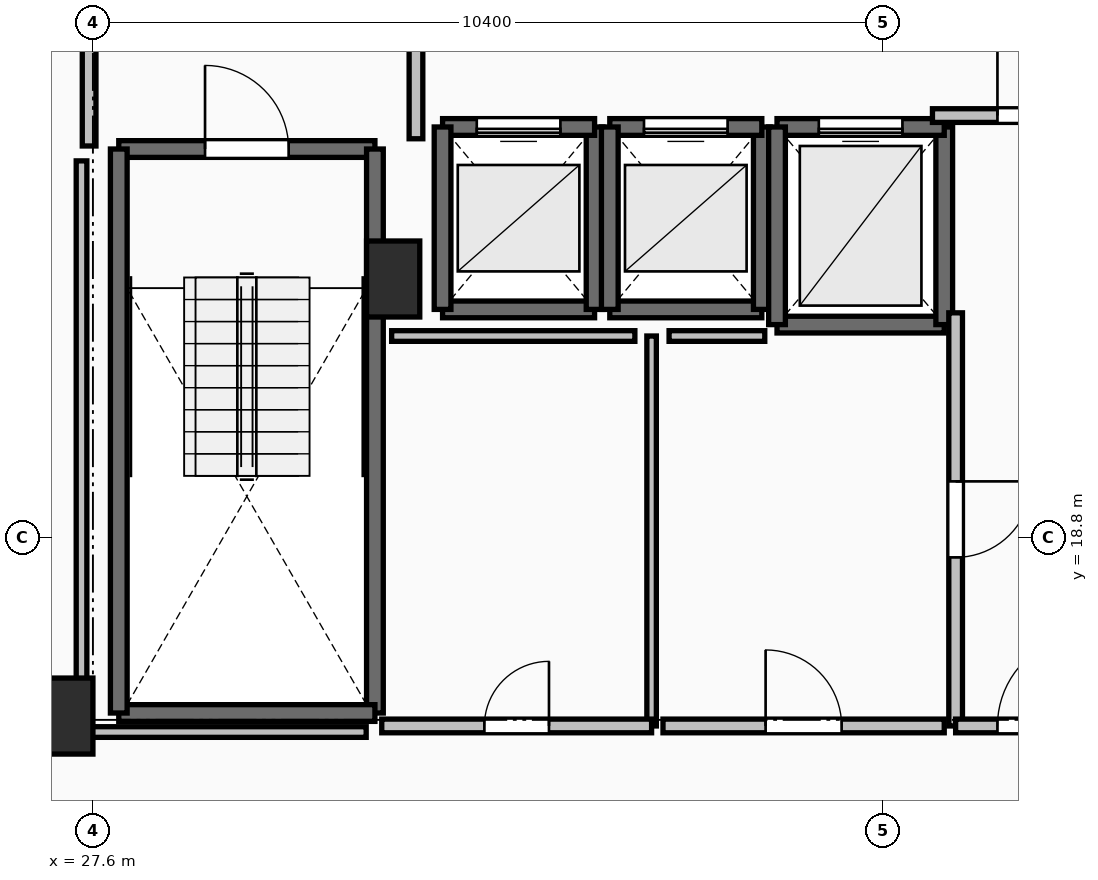
"""IFC4 building model, lengths in metres.
Left out: names, types, materials, properties, quantities, classifications, styles, units other than length and angle.
Written with IfcOpenShell. Run it as: python <this file> out.ifc"""

import sys

from ifc_helpers import new_model, si_unit, direction, frame, frame_2d, origin, origin_2d, place, context, subcontext, project, spatial, rectangle, extrude, element, fill, save


model = new_model("IFC4")
c1 = context("Model", 3, precision=1e-05, world=origin(), true_north=direction((0.0, 1.0)))
c2 = subcontext(c1, "Body", "Model", "MODEL_VIEW")
j1 = project(units=[si_unit("LENGTHUNIT", "METRE"), si_unit("PLANEANGLEUNIT", "RADIAN")], contexts=[c1])
p1 = place(None, origin())
s1 = spatial("IfcSite", under=j1, at=p1, CompositionType="ELEMENT")
p2 = place(p1, origin())
s2 = spatial("IfcBuilding", under=s1, at=p2, CompositionType="ELEMENT")
p3 = place(p2, frame((0.0, 0.0, 189.6)))
s3 = spatial("IfcBuildingStorey", under=s2, at=p3, CompositionType="ELEMENT", Elevation=189.6)
for number, where, z_axis, x_axis in (
    (1, (27.25, 16.45, 0.0), (0.0, 0.0, 1.0), (1.0, 0.0, 0.0)),
    (2, (31.55, 22.2, 0.0), (0.0, 0.0, 1.0), (1.0, 0.0, 0.0)),
):
    element("IfcColumn", number, at=place(p3, frame(where, z_axis=z_axis, x_axis=x_axis)), inside=s3, PredefinedType="PILASTER", context=c2, shape_type="SweptSolid", body=[
        extrude(rectangle(XDim=0.7, YDim=1.0, at=origin_2d()), origin(), (0.0, 0.0, 1.0), 3.5),
    ])
p4 = place(p3, frame((27.94, 23.91, 0.0), z_axis=(0.0, 0.0, 1.0), x_axis=(1.0, 0.0, 0.0)))
e3 = element("IfcWall", 3, at=p4, inside=s3, PredefinedType="SOLIDWALL", context=c2, shape_type="SweptSolid", body=[
    extrude(rectangle(XDim=3.37, YDim=0.22, at=frame_2d((1.685, 0.0))), origin(), (0.0, 0.0, 1.0), 3.24),
])
p5 = place(p4, frame((1.135, 0.0, 0.0)))
e4 = element("IfcOpeningElement", 4, at=p5, cuts=e3, PredefinedType="OPENING", context=c2, shape_type="SweptSolid", body=[
    extrude(rectangle(XDim=1.1, YDim=2.15, at=frame_2d((0.55, 1.075))), frame((0.0, 0.125, 0.0), z_axis=(0.0, -1.0, 0.0), x_axis=(1.0, 0.0, 0.0)), (0.0, 0.0, 1.0), 0.25),
])
p6 = place(p3, frame((31.31, 23.91, 0.0), z_axis=(0.0, 0.0, 1.0), x_axis=(0.0, -1.0, 0.0)))
e5 = element("IfcWall", 5, at=p6, inside=s3, PredefinedType="SOLIDWALL", context=c2, shape_type="SweptSolid", body=[
    extrude(rectangle(XDim=7.42, YDim=0.22, at=frame_2d((3.71, 0.0))), origin(), (0.0, 0.0, 1.0), 3.24),
])
p7 = place(p3, frame((31.31, 16.49, 0.0), z_axis=(0.0, 0.0, 1.0), x_axis=(-1.0, 0.0, 0.0)))
e6 = element("IfcWall", 6, at=p7, inside=s3, PredefinedType="SOLIDWALL", context=c2, shape_type="SweptSolid", body=[
    extrude(rectangle(XDim=3.37, YDim=0.22, at=frame_2d((1.685, 0.0))), origin(), (0.0, 0.0, 1.0), 3.24),
])
p8 = place(p3, frame((27.94, 16.49, 0.0), z_axis=(0.0, 0.0, 1.0), x_axis=(0.0, 1.0, 0.0)))
e7 = element("IfcWall", 7, at=p8, inside=s3, PredefinedType="SOLIDWALL", context=c2, shape_type="SweptSolid", body=[
    extrude(rectangle(XDim=7.42, YDim=0.22, at=frame_2d((3.71, 0.0))), origin(), (0.0, 0.0, 1.0), 3.24),
])
p9 = place(p3, frame((32.2, 21.8, 0.0), z_axis=(0.0, 0.0, 1.0), x_axis=(1.0, 0.0, 0.0)))
e8 = element("IfcWall", 8, at=p9, inside=s3, PredefinedType="SOLIDWALL", context=c2, shape_type="SweptSolid", body=[
    extrude(rectangle(XDim=2.0, YDim=0.22, at=frame_2d((1.0, 0.0))), origin(), (0.0, 0.0, 1.0), 3.24),
])
p10 = place(p3, frame((34.2, 21.8, 0.0), z_axis=(0.0, 0.0, 1.0), x_axis=(0.0, 1.0, 0.0)))
e9 = element("IfcWall", 9, at=p10, inside=s3, PredefinedType="SOLIDWALL", context=c2, shape_type="SweptSolid", body=[
    extrude(rectangle(XDim=2.4, YDim=0.22, at=frame_2d((1.2, 0.0))), origin(), (0.0, 0.0, 1.0), 3.24),
])
p11 = place(p3, frame((34.2, 24.2, 0.0), z_axis=(0.0, 0.0, 1.0), x_axis=(-1.0, 0.0, 0.0)))
e10 = element("IfcWall", 10, at=p11, inside=s3, PredefinedType="SOLIDWALL", context=c2, shape_type="SweptSolid", body=[
    extrude(rectangle(XDim=2.0, YDim=0.22, at=frame_2d((1.0, 0.0))), origin(), (0.0, 0.0, 1.0), 3.24),
])
p12 = place(p11, frame((0.45, 0.0, 0.0)))
e11 = element("IfcOpeningElement", 11, at=p12, cuts=e10, PredefinedType="OPENING", context=c2, shape_type="SweptSolid", body=[
    extrude(rectangle(XDim=1.1, YDim=2.2, at=frame_2d((0.55, 1.1))), frame((0.0, 0.125, 0.0), z_axis=(0.0, -1.0, 0.0), x_axis=(1.0, 0.0, 0.0)), (0.0, 0.0, 1.0), 0.25),
])
p13 = place(p3, frame((32.2, 24.2, 0.0), z_axis=(0.0, 0.0, 1.0), x_axis=(0.0, -1.0, 0.0)))
e12 = element("IfcWall", 12, at=p13, inside=s3, PredefinedType="SOLIDWALL", context=c2, shape_type="SweptSolid", body=[
    extrude(rectangle(XDim=2.4, YDim=0.22, at=frame_2d((1.2, 0.0))), origin(), (0.0, 0.0, 1.0), 3.24),
])
p14 = place(p3, frame((34.4, 21.8, 0.0), z_axis=(0.0, 0.0, 1.0), x_axis=(1.0, 0.0, 0.0)))
e13 = element("IfcWall", 13, at=p14, inside=s3, PredefinedType="SOLIDWALL", context=c2, shape_type="SweptSolid", body=[
    extrude(rectangle(XDim=2.0, YDim=0.22, at=frame_2d((1.0, 0.0))), origin(), (0.0, 0.0, 1.0), 3.24),
])
p15 = place(p3, frame((36.4, 21.8, 0.0), z_axis=(0.0, 0.0, 1.0), x_axis=(0.0, 1.0, 0.0)))
e14 = element("IfcWall", 14, at=p15, inside=s3, PredefinedType="SOLIDWALL", context=c2, shape_type="SweptSolid", body=[
    extrude(rectangle(XDim=2.4, YDim=0.22, at=frame_2d((1.2, 0.0))), origin(), (0.0, 0.0, 1.0), 3.24),
])
p16 = place(p3, frame((36.4, 24.2, 0.0), z_axis=(0.0, 0.0, 1.0), x_axis=(-1.0, 0.0, 0.0)))
e15 = element("IfcWall", 15, at=p16, inside=s3, PredefinedType="SOLIDWALL", context=c2, shape_type="SweptSolid", body=[
    extrude(rectangle(XDim=2.0, YDim=0.22, at=frame_2d((1.0, 0.0))), origin(), (0.0, 0.0, 1.0), 3.24),
])
p17 = place(p16, frame((0.45, 0.0, 0.0)))
e16 = element("IfcOpeningElement", 16, at=p17, cuts=e15, PredefinedType="OPENING", context=c2, shape_type="SweptSolid", body=[
    extrude(rectangle(XDim=1.1, YDim=2.2, at=frame_2d((0.55, 1.1))), frame((0.0, 0.125, 0.0), z_axis=(0.0, -1.0, 0.0), x_axis=(1.0, 0.0, 0.0)), (0.0, 0.0, 1.0), 0.25),
])
p18 = place(p3, frame((34.4, 24.2, 0.0), z_axis=(0.0, 0.0, 1.0), x_axis=(0.0, -1.0, 0.0)))
e17 = element("IfcWall", 17, at=p18, inside=s3, PredefinedType="SOLIDWALL", context=c2, shape_type="SweptSolid", body=[
    extrude(rectangle(XDim=2.4, YDim=0.22, at=frame_2d((1.2, 0.0))), origin(), (0.0, 0.0, 1.0), 3.24),
])
p19 = place(p3, frame((36.6, 21.6, 0.0), z_axis=(0.0, 0.0, 1.0), x_axis=(1.0, 0.0, 0.0)))
e18 = element("IfcWall", 18, at=p19, inside=s3, PredefinedType="SOLIDWALL", context=c2, shape_type="SweptSolid", body=[
    extrude(rectangle(XDim=2.2, YDim=0.22, at=frame_2d((1.1, 0.0))), origin(), (0.0, 0.0, 1.0), 3.24),
])
p20 = place(p3, frame((38.8, 21.6, 0.0), z_axis=(0.0, 0.0, 1.0), x_axis=(0.0, 1.0, 0.0)))
e19 = element("IfcWall", 19, at=p20, inside=s3, PredefinedType="SOLIDWALL", context=c2, shape_type="SweptSolid", body=[
    extrude(rectangle(XDim=2.6, YDim=0.22, at=frame_2d((1.3, 0.0))), origin(), (0.0, 0.0, 1.0), 3.24),
])
p21 = place(p3, frame((38.8, 24.2, 0.0), z_axis=(0.0, 0.0, 1.0), x_axis=(-1.0, 0.0, 0.0)))
e20 = element("IfcWall", 20, at=p21, inside=s3, PredefinedType="SOLIDWALL", context=c2, shape_type="SweptSolid", body=[
    extrude(rectangle(XDim=2.2, YDim=0.22, at=frame_2d((1.1, 0.0))), origin(), (0.0, 0.0, 1.0), 3.24),
])
p22 = place(p21, frame((0.55, 0.0, 0.0)))
e21 = element("IfcOpeningElement", 21, at=p22, cuts=e20, PredefinedType="OPENING", context=c2, shape_type="SweptSolid", body=[
    extrude(rectangle(XDim=1.1, YDim=2.2, at=frame_2d((0.55, 1.1))), frame((0.0, 0.125, 0.0), z_axis=(0.0, -1.0, 0.0), x_axis=(1.0, 0.0, 0.0)), (0.0, 0.0, 1.0), 0.25),
])
p23 = place(p3, frame((36.6, 24.2, 0.0), z_axis=(0.0, 0.0, 1.0), x_axis=(0.0, -1.0, 0.0)))
e22 = element("IfcWall", 22, at=p23, inside=s3, PredefinedType="SOLIDWALL", context=c2, shape_type="SweptSolid", body=[
    extrude(rectangle(XDim=2.6, YDim=0.22, at=frame_2d((1.3, 0.0))), origin(), (0.0, 0.0, 1.0), 3.24),
])
p24 = place(p3, frame((31.85, 24.045, 0.0), z_axis=(0.0, 0.0, 1.0), x_axis=(0.0, 1.0, 0.0)))
e23 = element("IfcWall", 23, at=p24, inside=s3, PredefinedType="PARTITIONING", context=c2, shape_type="SweptSolid", body=[
    extrude(rectangle(XDim=3.91, YDim=0.18, at=frame_2d((1.955, 0.0))), origin(), (0.0, 0.0, 1.0), 3.24),
])
p25 = place(p24, frame((1.355, 0.0, 0.0)))
e24 = element("IfcOpeningElement", 24, at=p25, cuts=e23, PredefinedType="OPENING", context=c2, shape_type="SweptSolid", body=[
    extrude(rectangle(XDim=1.2, YDim=2.15, at=frame_2d((0.6, 1.075))), frame((0.0, 0.105, 0.0), z_axis=(0.0, -1.0, 0.0), x_axis=(1.0, 0.0, 0.0)), (0.0, 0.0, 1.0), 0.21),
])
p26 = place(p3, frame((27.55, 28.0, 0.0), z_axis=(0.0, 0.0, 1.0), x_axis=(0.0, -1.0, 0.0)))
e25 = element("IfcWall", 25, at=p26, inside=s3, PredefinedType="PARTITIONING", context=c2, shape_type="SweptSolid", body=[
    extrude(rectangle(XDim=4.05, YDim=0.18, at=frame_2d((2.025, 0.0))), origin(), (0.0, 0.0, 1.0), 3.24),
])
p27 = place(p26, frame((1.425, 0.0, 0.0)))
e26 = element("IfcOpeningElement", 26, at=p27, cuts=e25, PredefinedType="OPENING", context=c2, shape_type="SweptSolid", body=[
    extrude(rectangle(XDim=1.2, YDim=2.15, at=frame_2d((0.6, 1.075))), frame((0.0, 0.105, 0.0), z_axis=(0.0, -1.0, 0.0), x_axis=(1.0, 0.0, 0.0)), (0.0, 0.0, 1.0), 0.21),
])
p28 = place(p3, frame((38.645, 24.35, 0.0), z_axis=(0.0, 0.0, 1.0), x_axis=(1.0, 0.0, 0.0)))
e27 = element("IfcWall", 27, at=p28, inside=s3, PredefinedType="PARTITIONING", context=c2, shape_type="SweptSolid", body=[
    extrude(rectangle(XDim=2.91, YDim=0.18, at=frame_2d((1.455, 0.0))), origin(), (0.0, 0.0, 1.0), 3.24),
])
p29 = place(p28, frame((0.855, 0.0, 0.0)))
e28 = element("IfcOpeningElement", 28, at=p29, cuts=e27, PredefinedType="OPENING", context=c2, shape_type="SweptSolid", body=[
    extrude(rectangle(XDim=1.2, YDim=2.15, at=frame_2d((0.6, 1.075))), frame((0.0, 0.105, 0.0), z_axis=(0.0, -1.0, 0.0), x_axis=(1.0, 0.0, 0.0)), (0.0, 0.0, 1.0), 0.21),
])
p30 = place(p3, frame((38.95, 21.755, 0.0), z_axis=(0.0, 0.0, 1.0), x_axis=(0.0, -1.0, 0.0)))
e29 = element("IfcWall", 29, at=p30, inside=s3, PredefinedType="PARTITIONING", context=c2, shape_type="SweptSolid", body=[
    extrude(rectangle(XDim=5.435, YDim=0.18, at=frame_2d((2.717, 0.0))), origin(), (0.0, 0.0, 1.0), 3.24),
])
p31 = place(p30, frame((2.218, 0.0, 0.0)))
e30 = element("IfcOpeningElement", 30, at=p31, cuts=e29, PredefinedType="OPENING", context=c2, shape_type="SweptSolid", body=[
    extrude(rectangle(XDim=1.0, YDim=2.15, at=frame_2d((0.5, 1.075))), frame((0.0, 0.105, 0.0), z_axis=(0.0, -1.0, 0.0), x_axis=(1.0, 0.0, 0.0)), (0.0, 0.0, 1.0), 0.21),
])
p32 = place(p3, frame((38.95, 16.32, 0.0), z_axis=(0.0, 0.0, 1.0), x_axis=(1.0, 0.0, 0.0)))
e31 = element("IfcWall", 31, at=p32, inside=s3, PredefinedType="PARTITIONING", context=c2, shape_type="SweptSolid", body=[
    extrude(rectangle(XDim=2.3, YDim=0.18, at=frame_2d((1.15, 0.0))), origin(), (0.0, 0.0, 1.0), 3.24),
])
p33 = place(p32, frame((0.55, 0.0, 0.0)))
e32 = element("IfcOpeningElement", 32, at=p33, cuts=e31, PredefinedType="OPENING", context=c2, shape_type="SweptSolid", body=[
    extrude(rectangle(XDim=1.2, YDim=2.15, at=frame_2d((0.6, 1.075))), frame((0.0, 0.105, 0.0), z_axis=(0.0, -1.0, 0.0), x_axis=(1.0, 0.0, 0.0)), (0.0, 0.0, 1.0), 0.21),
])
p34 = place(p3, frame((34.95, 16.32, 0.0), z_axis=(0.0, 0.0, 1.0), x_axis=(0.0, 1.0, 0.0)))
e33 = element("IfcWall", 33, at=p34, inside=s3, PredefinedType="PARTITIONING", context=c2, shape_type="SweptSolid", body=[
    extrude(rectangle(XDim=5.13, YDim=0.125, at=frame_2d((2.565, 0.0))), origin(), (0.0, 0.0, 1.0), 3.24),
])
p35 = place(p3, frame((31.4, 16.32, 0.0), z_axis=(0.0, 0.0, 1.0), x_axis=(1.0, 0.0, 0.0)))
e34 = element("IfcWall", 34, at=p35, inside=s3, PredefinedType="PARTITIONING", context=c2, shape_type="SweptSolid", body=[
    extrude(rectangle(XDim=3.55, YDim=0.18, at=frame_2d((1.775, 0.0))), origin(), (0.0, 0.0, 1.0), 3.24),
])
p36 = place(p35, frame((1.35, 0.0, 0.0)))
e35 = element("IfcOpeningElement", 35, at=p36, cuts=e34, PredefinedType="OPENING", context=c2, shape_type="SweptSolid", body=[
    extrude(rectangle(XDim=0.85, YDim=2.1, at=frame_2d((0.425, 1.05))), frame((0.0, 0.105, 0.0), z_axis=(0.0, -1.0, 0.0), x_axis=(1.0, 0.0, 0.0)), (0.0, 0.0, 1.0), 0.21),
])
p37 = place(p3, frame((35.1, 16.32, 0.0), z_axis=(0.0, 0.0, 1.0), x_axis=(1.0, 0.0, 0.0)))
e36 = element("IfcWall", 36, at=p37, inside=s3, PredefinedType="PARTITIONING", context=c2, shape_type="SweptSolid", body=[
    extrude(rectangle(XDim=3.7, YDim=0.18, at=frame_2d((1.85, 0.0))), origin(), (0.0, 0.0, 1.0), 3.24),
])
p38 = place(p37, frame((1.35, 0.0, 0.0)))
e37 = element("IfcOpeningElement", 37, at=p38, cuts=e36, PredefinedType="OPENING", context=c2, shape_type="SweptSolid", body=[
    extrude(rectangle(XDim=1.0, YDim=2.15, at=frame_2d((0.5, 1.075))), frame((0.0, 0.105, 0.0), z_axis=(0.0, -1.0, 0.0), x_axis=(1.0, 0.0, 0.0)), (0.0, 0.0, 1.0), 0.21),
])
p39 = place(p3, frame((34.73, 21.45, 0.0), z_axis=(0.0, 0.0, 1.0), x_axis=(-1.0, 0.0, 0.0)))
e38 = element("IfcWall", 38, at=p39, inside=s3, PredefinedType="PARTITIONING", context=c2, shape_type="SweptSolid", body=[
    extrude(rectangle(XDim=3.2, YDim=0.14, at=frame_2d((1.6, 0.0))), origin(), (0.0, 0.0, 1.0), 3.24),
])
p40 = place(p3, frame((36.439, 21.45, 0.0), z_axis=(0.0, 0.0, 1.0), x_axis=(-1.0, 0.0, 0.0)))
e39 = element("IfcWall", 39, at=p40, inside=s3, PredefinedType="PARTITIONING", context=c2, shape_type="SweptSolid", body=[
    extrude(rectangle(XDim=1.259, YDim=0.14, at=frame_2d((0.629, 0.0))), origin(), (0.0, 0.0, 1.0), 3.24),
])
p41 = place(p3, frame((27.45, 23.754, 0.0), z_axis=(0.0, 0.0, 1.0), x_axis=(0.0, -1.0, 0.0)))
e40 = element("IfcWall", 40, at=p41, inside=s3, PredefinedType="PARTITIONING", context=c2, shape_type="SweptSolid", body=[
    extrude(rectangle(XDim=7.514, YDim=0.14, at=frame_2d((3.757, 0.0))), origin(), (0.0, 0.0, 1.0), 2.432),
])
p42 = place(p3, frame((27.45, 16.24, 0.0), z_axis=(0.0, 0.0, 1.0), x_axis=(1.0, 0.0, 0.0)))
e41 = element("IfcWall", 41, at=p42, inside=s3, PredefinedType="PARTITIONING", context=c2, shape_type="SweptSolid", body=[
    extrude(rectangle(XDim=3.745, YDim=0.14, at=frame_2d((1.873, 0.0))), origin(), (0.0, 0.0, 1.0), 2.432),
])
p43 = place(p5, origin())
e42 = element("IfcDoor", 42, at=p43, inside=s3, OperationType="SINGLE_SWING_LEFT", PredefinedType="DOOR", context=c2, shape_type="SweptSolid", body=[
    extrude(rectangle(XDim=1.1, YDim=2.15, at=frame_2d((0.55, 1.075))), frame((0.0, 0.025, 0.0), z_axis=(0.0, -1.0, 0.0), x_axis=(1.0, 0.0, 0.0)), (0.0, 0.0, 1.0), 0.05),
])
fill(e4, e42)
p44 = place(p12, origin())
e43 = element("IfcDoor", 43, at=p44, inside=s3, OperationType="SLIDING_TO_LEFT", PredefinedType="DOOR", context=c2, shape_type="SweptSolid", body=[
    extrude(rectangle(XDim=1.1, YDim=2.2, at=frame_2d((0.55, 1.1))), frame((0.0, 0.025, 0.0), z_axis=(0.0, -1.0, 0.0), x_axis=(1.0, 0.0, 0.0)), (0.0, 0.0, 1.0), 0.05),
])
fill(e11, e43)
p45 = place(p17, origin())
e44 = element("IfcDoor", 44, at=p45, inside=s3, OperationType="SLIDING_TO_LEFT", PredefinedType="DOOR", context=c2, shape_type="SweptSolid", body=[
    extrude(rectangle(XDim=1.1, YDim=2.2, at=frame_2d((0.55, 1.1))), frame((0.0, 0.025, 0.0), z_axis=(0.0, -1.0, 0.0), x_axis=(1.0, 0.0, 0.0)), (0.0, 0.0, 1.0), 0.05),
])
fill(e16, e44)
p46 = place(p22, origin())
e45 = element("IfcDoor", 45, at=p46, inside=s3, OperationType="SLIDING_TO_LEFT", PredefinedType="DOOR", context=c2, shape_type="SweptSolid", body=[
    extrude(rectangle(XDim=1.1, YDim=2.2, at=frame_2d((0.55, 1.1))), frame((0.0, 0.025, 0.0), z_axis=(0.0, -1.0, 0.0), x_axis=(1.0, 0.0, 0.0)), (0.0, 0.0, 1.0), 0.05),
])
fill(e21, e45)
p47 = place(p29, origin())
e46 = element("IfcDoor", 46, at=p47, inside=s3, OperationType="SINGLE_SWING_LEFT", PredefinedType="DOOR", context=c2, shape_type="SweptSolid", body=[
    extrude(rectangle(XDim=1.2, YDim=2.15, at=frame_2d((0.6, 1.075))), frame((0.0, 0.025, 0.0), z_axis=(0.0, -1.0, 0.0), x_axis=(1.0, 0.0, 0.0)), (0.0, 0.0, 1.0), 0.05),
])
fill(e28, e46)
p48 = place(p31, origin())
e47 = element("IfcDoor", 47, at=p48, inside=s3, OperationType="SINGLE_SWING_LEFT", PredefinedType="DOOR", context=c2, shape_type="SweptSolid", body=[
    extrude(rectangle(XDim=1.0, YDim=2.15, at=frame_2d((0.5, 1.075))), frame((0.0, 0.025, 0.0), z_axis=(0.0, -1.0, 0.0), x_axis=(1.0, 0.0, 0.0)), (0.0, 0.0, 1.0), 0.05),
])
fill(e30, e47)
p49 = place(p33, origin())
e48 = element("IfcDoor", 48, at=p49, inside=s3, OperationType="SINGLE_SWING_RIGHT", PredefinedType="DOOR", context=c2, shape_type="SweptSolid", body=[
    extrude(rectangle(XDim=1.2, YDim=2.15, at=frame_2d((0.6, 1.075))), frame((0.0, 0.025, 0.0), z_axis=(0.0, -1.0, 0.0), x_axis=(1.0, 0.0, 0.0)), (0.0, 0.0, 1.0), 0.05),
])
fill(e32, e48)
p50 = place(p36, origin())
e49 = element("IfcDoor", 49, at=p50, inside=s3, OperationType="SINGLE_SWING_RIGHT", PredefinedType="DOOR", context=c2, shape_type="SweptSolid", body=[
    extrude(rectangle(XDim=0.85, YDim=2.1, at=frame_2d((0.425, 1.05))), frame((0.0, 0.025, 0.0), z_axis=(0.0, -1.0, 0.0), x_axis=(1.0, 0.0, 0.0)), (0.0, 0.0, 1.0), 0.05),
])
fill(e35, e49)
p51 = place(p38, origin())
e50 = element("IfcDoor", 50, at=p51, inside=s3, OperationType="SINGLE_SWING_LEFT", PredefinedType="DOOR", context=c2, shape_type="SweptSolid", body=[
    extrude(rectangle(XDim=1.0, YDim=2.15, at=frame_2d((0.5, 1.075))), frame((0.0, 0.025, 0.0), z_axis=(0.0, -1.0, 0.0), x_axis=(1.0, 0.0, 0.0)), (0.0, 0.0, 1.0), 0.05),
])
fill(e37, e50)
save(model, sys.argv[1])
